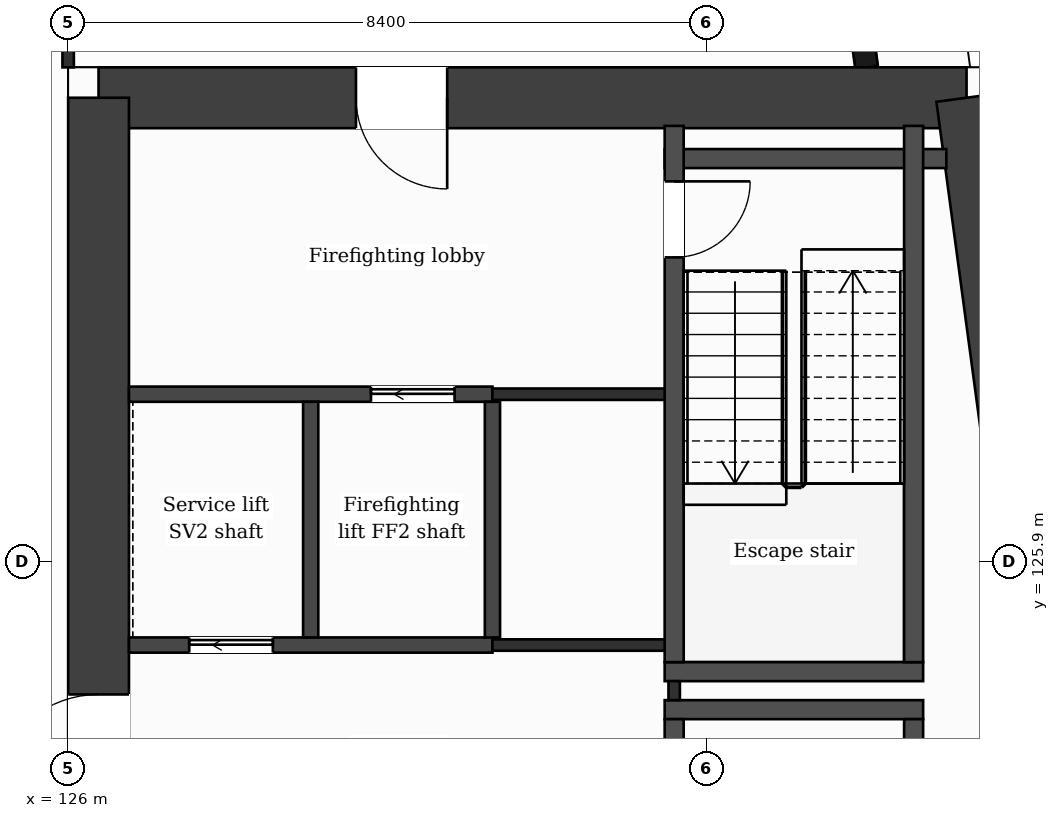
"""IFC4 building model, lengths in metres.
Left out: names, types, materials, properties, quantities, classifications, styles, units other than length and angle.
Written with IfcOpenShell. Run it as: python <this file> out.ifc"""

import sys

from ifc_helpers import new_model, si_unit, direction, frame, frame_2d, origin, place, context, subcontext, project, spatial, rectangle, extrude, element, fill, save


model = new_model("IFC4")
c1 = context("Model", 3, precision=1e-05, world=origin(), true_north=direction((0.0, 1.0)))
c2 = subcontext(c1, "Body", "Model", "MODEL_VIEW")
j1 = project(units=[si_unit("LENGTHUNIT", "METRE"), si_unit("PLANEANGLEUNIT", "RADIAN")], contexts=[c1])
p1 = place(None, origin())
s1 = spatial("IfcSite", under=j1, at=p1, CompositionType="ELEMENT")
p2 = place(p1, origin())
s2 = spatial("IfcBuilding", under=s1, at=p2, CompositionType="ELEMENT")
p3 = place(p2, frame((0.0, 0.0, 235.5)))
s3 = spatial("IfcBuildingStorey", under=s2, at=p3, CompositionType="ELEMENT", Elevation=235.5)
p4 = place(p3, frame((126.4, 132.0, 0.0), z_axis=(0.0, 0.0, 1.0), x_axis=(1.0, 0.0, 0.0)))
e1 = element("IfcWall", 1, at=p4, inside=s3, PredefinedType="SHEAR", context=c2, shape_type="SweptSolid", body=[
    extrude(rectangle(XDim=11.42, YDim=0.8, at=frame_2d((5.71, 0.0))), origin(), (0.0, 0.0, 1.0), 3.7),
])
p5 = place(p4, frame((3.386, 0.0, 0.0)))
e2 = element("IfcOpeningElement", 2, at=p5, cuts=e1, PredefinedType="OPENING", context=c2, shape_type="SweptSolid", body=[
    extrude(rectangle(XDim=1.2, YDim=2.1, at=frame_2d((0.6, 1.05))), frame((0.0, 0.41, 0.0), z_axis=(0.0, -1.0, 0.0), x_axis=(1.0, 0.0, 0.0)), (0.0, 0.0, 1.0), 0.82),
])
p6 = place(p3, frame((137.82, 132.0, 0.0), z_axis=(0.0, 0.0, 1.0), x_axis=(0.133408347329, -0.991061154956, 0.0)))
e3 = element("IfcWall", 3, at=p6, inside=s3, PredefinedType="SHEAR", context=c2, shape_type="SweptSolid", body=[
    extrude(rectangle(XDim=21.391, YDim=0.8, at=frame_2d((10.696, 0.0))), origin(), (0.0, 0.0, 1.0), 3.7),
])
p7 = place(p3, frame((126.4, 110.8, 0.0), z_axis=(0.0, 0.0, 1.0), x_axis=(0.0, 1.0, 0.0)))
e4 = element("IfcWall", 4, at=p7, inside=s3, PredefinedType="SHEAR", context=c2, shape_type="SweptSolid", body=[
    extrude(rectangle(XDim=21.2, YDim=0.8, at=frame_2d((10.6, 0.0))), origin(), (0.0, 0.0, 1.0), 3.7),
])
p8 = place(p7, frame((11.95, 0.0, 0.0)))
e5 = element("IfcOpeningElement", 5, at=p8, cuts=e4, PredefinedType="OPENING", context=c2, shape_type="SweptSolid", body=[
    extrude(rectangle(XDim=1.4, YDim=2.1, at=frame_2d((0.7, 1.05))), frame((0.0, 0.41, 0.0), z_axis=(0.0, -1.0, 0.0), x_axis=(1.0, 0.0, 0.0)), (0.0, 0.0, 1.0), 0.82),
])
p9 = place(p3, frame((136.504, 132.4, 0.0), z_axis=(0.0, 0.0, 1.0), x_axis=(-0.133399697462, 0.99106231929, 0.0)))
e6 = element("IfcWall", 6, at=p9, inside=s3, PredefinedType="SOLIDWALL", context=c2, shape_type="SweptSolid", body=[
    extrude(rectangle(XDim=6.74, YDim=0.3, at=frame_2d((3.37, 0.0))), origin(), (0.0, 0.0, 1.0), 3.38),
])
p10 = place(p9, frame((1.115, 0.0, 0.0)))
e7 = element("IfcOpeningElement", 7, at=p10, cuts=e6, PredefinedType="OPENING", context=c2, shape_type="SweptSolid", body=[
    extrude(rectangle(XDim=1.2, YDim=2.4, at=frame_2d((0.6, 1.2))), frame((0.0, 0.16, 0.0), z_axis=(0.0, -1.0, 0.0), x_axis=(1.0, 0.0, 0.0)), (0.0, 0.0, 1.0), 0.32),
])
p11 = place(p9, frame((4.436, 0.0, 0.9)))
e8 = element("IfcOpeningElement", 8, at=p11, cuts=e6, PredefinedType="OPENING", context=c2, shape_type="SweptSolid", body=[
    extrude(rectangle(XDim=1.2, YDim=2.1, at=frame_2d((0.6, 1.05))), frame((0.0, 0.16, 0.0), z_axis=(0.0, -1.0, 0.0), x_axis=(1.0, 0.0, 0.0)), (0.0, 0.0, 1.0), 0.32),
])
for number, where, z_axis, x_axis in (
    (9, (133.848, 123.95, 0.0), (0.0, 0.0, 1.0), (1.0, 0.0, 0.0)),
    (10, (133.848, 124.45, 0.0), (0.0, 0.0, 1.0), (1.0, 0.0, 0.0)),
):
    element("IfcWall", number, at=place(p3, frame(where, z_axis=z_axis, x_axis=x_axis)), inside=s3, PredefinedType="PARTITIONING", context=c2, shape_type="SweptSolid", body=[
        extrude(rectangle(XDim=3.4, YDim=0.25, at=frame_2d((1.7, 0.0))), origin(), (0.0, 0.0, 1.0), 3.38),
    ])
p12 = place(p3, frame((126.8, 124.8, 0.0), z_axis=(0.0, 0.0, 1.0), x_axis=(1.0, 0.0, 0.0)))
e11 = element("IfcWall", 11, at=p12, inside=s3, PredefinedType="PARTITIONING", context=c2, shape_type="SweptSolid", body=[
    extrude(rectangle(XDim=4.782, YDim=0.2, at=frame_2d((2.391, 0.0))), origin(), (0.0, 0.0, 1.0), 3.38),
])
p13 = place(p12, frame((0.793, 0.0, 0.0)))
e12 = element("IfcOpeningElement", 12, at=p13, cuts=e11, PredefinedType="OPENING", context=c2, shape_type="SweptSolid", body=[
    extrude(rectangle(XDim=1.1, YDim=2.1, at=frame_2d((0.55, 1.05))), frame((0.0, 0.11, 0.0), z_axis=(0.0, -1.0, 0.0), x_axis=(1.0, 0.0, 0.0)), (0.0, 0.0, 1.0), 0.22),
])
p14 = place(p3, frame((131.582, 124.8, 0.0), z_axis=(0.0, 0.0, 1.0), x_axis=(1.0, 0.0, 0.0)))
e13 = element("IfcWall", 13, at=p14, inside=s3, PredefinedType="PARTITIONING", context=c2, shape_type="SweptSolid", body=[
    extrude(rectangle(XDim=2.516, YDim=0.15, at=frame_2d((1.258, 0.0))), origin(), (0.0, 0.0, 1.0), 3.38),
])
p15 = place(p3, frame((126.8, 128.1, 0.0), z_axis=(0.0, 0.0, 1.0), x_axis=(1.0, 0.0, 0.0)))
e14 = element("IfcWall", 14, at=p15, inside=s3, PredefinedType="PARTITIONING", context=c2, shape_type="SweptSolid", body=[
    extrude(rectangle(XDim=4.782, YDim=0.2, at=frame_2d((2.391, 0.0))), origin(), (0.0, 0.0, 1.0), 3.38),
])
p16 = place(p15, frame((3.184, 0.0, 0.0)))
e15 = element("IfcOpeningElement", 15, at=p16, cuts=e14, PredefinedType="OPENING", context=c2, shape_type="SweptSolid", body=[
    extrude(rectangle(XDim=1.1, YDim=2.1, at=frame_2d((0.55, 1.05))), frame((0.0, 0.11, 0.0), z_axis=(0.0, -1.0, 0.0), x_axis=(1.0, 0.0, 0.0)), (0.0, 0.0, 1.0), 0.22),
])
p17 = place(p3, frame((131.582, 128.1, 0.0), z_axis=(0.0, 0.0, 1.0), x_axis=(1.0, 0.0, 0.0)))
e16 = element("IfcWall", 16, at=p17, inside=s3, PredefinedType="PARTITIONING", context=c2, shape_type="SweptSolid", body=[
    extrude(rectangle(XDim=2.391, YDim=0.15, at=frame_2d((1.195, 0.0))), origin(), (0.0, 0.0, 1.0), 3.38),
])
p18 = place(p3, frame((133.848, 131.2, 0.0), z_axis=(0.0, 0.0, 1.0), x_axis=(1.0, 0.0, 0.0)))
e17 = element("IfcWall", 17, at=p18, inside=s3, PredefinedType="PARTITIONING", context=c2, shape_type="SweptSolid", body=[
    extrude(rectangle(XDim=3.706, YDim=0.25, at=frame_2d((1.853, 0.0))), origin(), (0.0, 0.0, 1.0), 3.38),
])
p19 = place(p3, frame((126.0, 132.4, 0.0), z_axis=(0.0, 0.0, 1.0), x_axis=(0.0, 1.0, 0.0)))
e18 = element("IfcWall", 18, at=p19, inside=s3, PredefinedType="PARTITIONING", context=c2, shape_type="SweptSolid", body=[
    extrude(rectangle(XDim=1.325, YDim=0.15, at=frame_2d((0.663, 0.0))), origin(), (0.0, 0.0, 1.0), 3.38),
])
for number, where, z_axis, x_axis in (
    (19, (129.191, 124.9, 0.0), (0.0, 0.0, 1.0), (0.0, 1.0, 0.0)),
    (20, (131.582, 124.9, 0.0), (0.0, 0.0, 1.0), (0.0, 1.0, 0.0)),
):
    element("IfcWall", number, at=place(p3, frame(where, z_axis=z_axis, x_axis=x_axis)), inside=s3, PredefinedType="PARTITIONING", context=c2, shape_type="SweptSolid", body=[
        extrude(rectangle(XDim=3.1, YDim=0.2, at=frame_2d((1.55, 0.0))), origin(), (0.0, 0.0, 1.0), 3.38),
    ])
p20 = place(p3, frame((133.973, 124.075, 0.0), z_axis=(0.0, 0.0, 1.0), x_axis=(0.0, 1.0, 0.0)))
e21 = element("IfcWall", 21, at=p20, inside=s3, PredefinedType="PARTITIONING", context=c2, shape_type="SweptSolid", body=[
    extrude(rectangle(XDim=0.25, YDim=0.15, at=frame_2d((0.125, 0.0))), origin(), (0.0, 0.0, 1.0), 3.38),
])
p21 = place(p3, frame((133.973, 116.77, 0.0), z_axis=(0.0, 0.0, 1.0), x_axis=(0.0, 1.0, 0.0)))
e22 = element("IfcWall", 22, at=p21, inside=s3, PredefinedType="PARTITIONING", context=c2, shape_type="SweptSolid", body=[
    extrude(rectangle(XDim=7.055, YDim=0.25, at=frame_2d((3.527, 0.0))), origin(), (0.0, 0.0, 1.0), 3.38),
])
p22 = place(p21, frame((5.755, 0.0, 0.0)))
e23 = element("IfcOpeningElement", 23, at=p22, cuts=e22, PredefinedType="OPENING", context=c2, shape_type="SweptSolid", body=[
    extrude(rectangle(XDim=0.95, YDim=2.1, at=frame_2d((0.475, 1.05))), frame((0.0, 0.135, 0.0), z_axis=(0.0, -1.0, 0.0), x_axis=(1.0, 0.0, 0.0)), (0.0, 0.0, 1.0), 0.27),
])
p23 = place(p3, frame((133.973, 124.575, 0.0), z_axis=(0.0, 0.0, 1.0), x_axis=(0.0, 1.0, 0.0)))
e24 = element("IfcWall", 24, at=p23, inside=s3, PredefinedType="PARTITIONING", context=c2, shape_type="SweptSolid", body=[
    extrude(rectangle(XDim=7.055, YDim=0.25, at=frame_2d((3.527, 0.0))), origin(), (0.0, 0.0, 1.0), 3.38),
])
p24 = place(p23, frame((5.325, 0.0, 0.0)))
e25 = element("IfcOpeningElement", 25, at=p24, cuts=e24, PredefinedType="OPENING", context=c2, shape_type="SweptSolid", body=[
    extrude(rectangle(XDim=1.0, YDim=2.1, at=frame_2d((0.5, 1.05))), frame((0.0, 0.135, 0.0), z_axis=(0.0, -1.0, 0.0), x_axis=(1.0, 0.0, 0.0)), (0.0, 0.0, 1.0), 0.27),
])
for number, where, z_axis, x_axis in (
    (26, (137.123, 116.77, 0.0), (0.0, 0.0, 1.0), (0.0, 1.0, 0.0)),
    (27, (137.123, 124.575, 0.0), (0.0, 0.0, 1.0), (0.0, 1.0, 0.0)),
):
    element("IfcWall", number, at=place(p3, frame(where, z_axis=z_axis, x_axis=x_axis)), inside=s3, PredefinedType="PARTITIONING", context=c2, shape_type="SweptSolid", body=[
        extrude(rectangle(XDim=7.055, YDim=0.25, at=frame_2d((3.527, 0.0))), origin(), (0.0, 0.0, 1.0), 3.38),
    ])
p25 = place(p16, origin())
e28 = element("IfcDoor", 28, at=p25, inside=s3, OperationType="SLIDING_TO_LEFT", PredefinedType="DOOR", context=c2, shape_type="SweptSolid", body=[
    extrude(rectangle(XDim=1.1, YDim=2.1, at=frame_2d((0.55, 1.05))), frame((0.0, 0.025, 0.0), z_axis=(0.0, -1.0, 0.0), x_axis=(1.0, 0.0, 0.0)), (0.0, 0.0, 1.0), 0.05),
])
fill(e15, e28)
p26 = place(p13, origin())
e29 = element("IfcDoor", 29, at=p26, inside=s3, OperationType="SLIDING_TO_LEFT", PredefinedType="DOOR", context=c2, shape_type="SweptSolid", body=[
    extrude(rectangle(XDim=1.1, YDim=2.1, at=frame_2d((0.55, 1.05))), frame((0.0, 0.025, 0.0), z_axis=(0.0, -1.0, 0.0), x_axis=(1.0, 0.0, 0.0)), (0.0, 0.0, 1.0), 0.05),
])
fill(e12, e29)
p27 = place(p24, origin())
e30 = element("IfcDoor", 30, at=p27, inside=s3, OperationType="SINGLE_SWING_RIGHT", PredefinedType="DOOR", context=c2, shape_type="SweptSolid", body=[
    extrude(rectangle(XDim=1.0, YDim=2.1, at=frame_2d((0.5, 1.05))), frame((0.0, 0.025, 0.0), z_axis=(0.0, -1.0, 0.0), x_axis=(1.0, 0.0, 0.0)), (0.0, 0.0, 1.0), 0.05),
])
fill(e25, e30)
p28 = place(p5, origin())
e31 = element("IfcDoor", 31, at=p28, inside=s3, OperationType="SINGLE_SWING_RIGHT", PredefinedType="DOOR", context=c2, shape_type="SweptSolid", body=[
    extrude(rectangle(XDim=1.2, YDim=2.1, at=frame_2d((0.6, 1.05))), frame((0.0, 0.025, 0.0), z_axis=(0.0, -1.0, 0.0), x_axis=(1.0, 0.0, 0.0)), (0.0, 0.0, 1.0), 0.05),
])
fill(e2, e31)
p29 = place(p8, origin())
e32 = element("IfcDoor", 32, at=p29, inside=s3, OperationType="SINGLE_SWING_LEFT", PredefinedType="DOOR", context=c2, shape_type="SweptSolid", body=[
    extrude(rectangle(XDim=1.4, YDim=2.1, at=frame_2d((0.7, 1.05))), frame((0.0, 0.025, 0.0), z_axis=(0.0, -1.0, 0.0), x_axis=(1.0, 0.0, 0.0)), (0.0, 0.0, 1.0), 0.05),
])
fill(e5, e32)
save(model, sys.argv[1])
